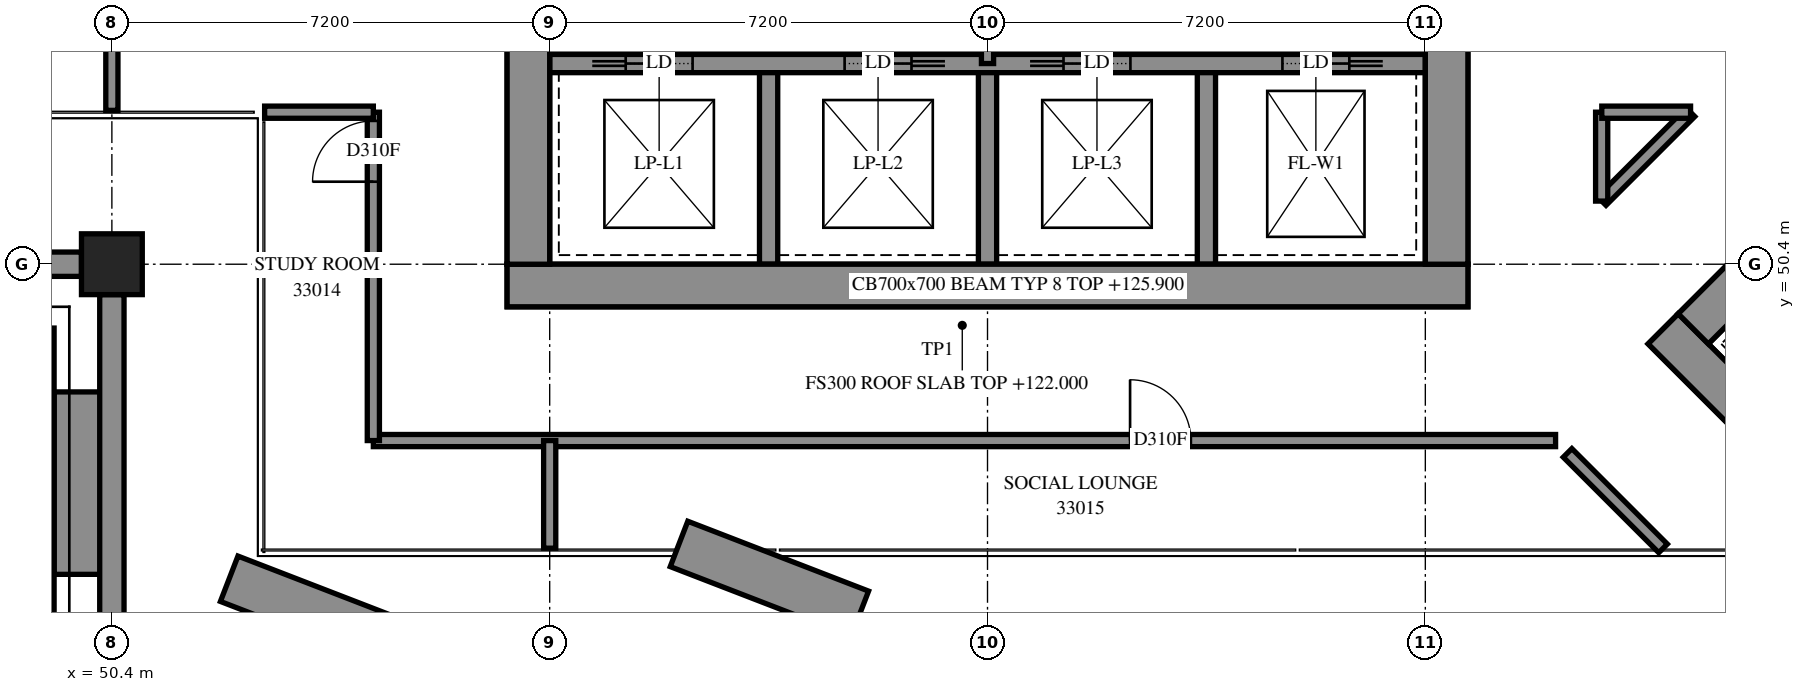
"""IFC4 building model, lengths in metres.
Left out: names, types, materials, properties, quantities, classifications, styles, units other than length and angle.
Written with IfcOpenShell. Run it as: python <this file> out.ifc"""

import sys

from ifc_helpers import new_model, si_unit, direction, frame, frame_2d, origin, origin_2d, place, context, subcontext, project, spatial, polyline, rectangle, outline, extrude, element, fill, save


model = new_model("IFC4")
c1 = context("Model", 3, precision=1e-05, world=origin(), true_north=direction((0.0, 1.0)))
c2 = subcontext(c1, "Body", "Model", "MODEL_VIEW")
j1 = project(units=[si_unit("LENGTHUNIT", "METRE"), si_unit("PLANEANGLEUNIT", "RADIAN")], contexts=[c1])
p1 = place(None, origin())
s1 = spatial("IfcSite", under=j1, at=p1, CompositionType="ELEMENT")
p2 = place(p1, origin())
s2 = spatial("IfcBuilding", under=s1, at=p2, CompositionType="ELEMENT")
p3 = place(p2, frame((0.0, 0.0, 122.0)))
s3 = spatial("IfcBuildingStorey", under=s2, at=p3, CompositionType="ELEMENT", Elevation=122.0)
p4 = place(p3, frame((50.4, 50.4, 0.0), z_axis=(0.0, 0.0, 1.0), x_axis=(1.0, 0.0, 0.0)))
e1 = element("IfcColumn", 1, at=p4, inside=s3, PredefinedType="COLUMN", context=c2, shape_type="SweptSolid", body=[
    extrude(rectangle(XDim=1.0, YDim=1.0, at=origin_2d()), origin(), (0.0, 0.0, 1.0), 3.9),
])
p5 = place(p3, frame((56.9, 50.05, -0.3), z_axis=(0.0, 0.0, 1.0), x_axis=(1.0, 0.0, 0.0)))
e2 = element("IfcWall", 2, at=p5, inside=s3, PredefinedType="SHEAR", context=c2, shape_type="SweptSolid", body=[
    extrude(rectangle(XDim=15.8, YDim=0.7, at=frame_2d((7.9, 0.0))), origin(), (0.0, 0.0, 1.0), 3.5),
])
p6 = place(p3, frame((57.25, 50.4, -0.3), z_axis=(0.0, 0.0, 1.0), x_axis=(0.0, 1.0, 0.0)))
e3 = element("IfcWall", 3, at=p6, inside=s3, PredefinedType="SHEAR", context=c2, shape_type="SweptSolid", body=[
    extrude(rectangle(XDim=14.4, YDim=0.7, at=frame_2d((7.2, 0.0))), origin(), (0.0, 0.0, 1.0), 3.5),
])
p7 = place(p6, frame((4.55, 0.0, 0.3)))
e4 = element("IfcOpeningElement", 4, at=p7, cuts=e3, PredefinedType="OPENING", context=c2, shape_type="SweptSolid", body=[
    extrude(rectangle(XDim=1.1, YDim=2.1, at=frame_2d((0.55, 1.05))), frame((0.0, 0.36, 0.0), z_axis=(0.0, -1.0, 0.0), x_axis=(1.0, 0.0, 0.0)), (0.0, 0.0, 1.0), 0.72),
])
p8 = place(p6, frame((11.35, 0.0, 0.3)))
e5 = element("IfcOpeningElement", 5, at=p8, cuts=e3, PredefinedType="OPENING", context=c2, shape_type="SweptSolid", body=[
    extrude(rectangle(XDim=1.1, YDim=2.1, at=frame_2d((0.55, 1.05))), frame((0.0, 0.36, 0.0), z_axis=(0.0, -1.0, 0.0), x_axis=(1.0, 0.0, 0.0)), (0.0, 0.0, 1.0), 0.72),
])
p9 = place(p3, frame((72.35, 50.4, -0.3), z_axis=(0.0, 0.0, 1.0), x_axis=(0.0, 1.0, 0.0)))
e6 = element("IfcWall", 6, at=p9, inside=s3, PredefinedType="SHEAR", context=c2, shape_type="SweptSolid", body=[
    extrude(rectangle(XDim=14.4, YDim=0.7, at=frame_2d((7.2, 0.0))), origin(), (0.0, 0.0, 1.0), 3.5),
])
p10 = place(p9, frame((4.55, 0.0, 0.3)))
e7 = element("IfcOpeningElement", 7, at=p10, cuts=e6, PredefinedType="OPENING", context=c2, shape_type="SweptSolid", body=[
    extrude(rectangle(XDim=1.1, YDim=2.1, at=frame_2d((0.55, 1.05))), frame((0.0, 0.36, 0.0), z_axis=(0.0, -1.0, 0.0), x_axis=(1.0, 0.0, 0.0)), (0.0, 0.0, 1.0), 0.72),
])
p11 = place(p9, frame((11.35, 0.0, 0.3)))
e8 = element("IfcOpeningElement", 8, at=p11, cuts=e6, PredefinedType="OPENING", context=c2, shape_type="SweptSolid", body=[
    extrude(rectangle(XDim=1.1, YDim=2.1, at=frame_2d((0.55, 1.05))), frame((0.0, 0.36, 0.0), z_axis=(0.0, -1.0, 0.0), x_axis=(1.0, 0.0, 0.0)), (0.0, 0.0, 1.0), 0.72),
])
for number, where, z_axis, x_axis in (
    (9, (61.2, 50.4, 0.0), (0.0, 0.0, 1.0), (0.0, 1.0, 0.0)),
    (10, (64.8, 50.4, 0.0), (0.0, 0.0, 1.0), (0.0, 1.0, 0.0)),
    (11, (68.4, 50.4, 0.0), (0.0, 0.0, 1.0), (0.0, 1.0, 0.0)),
):
    element("IfcWall", number, at=place(p3, frame(where, z_axis=z_axis, x_axis=x_axis)), inside=s3, PredefinedType="SOLIDWALL", context=c2, shape_type="SweptSolid", body=[
        extrude(rectangle(XDim=3.3, YDim=0.3, at=frame_2d((1.65, 0.0))), origin(), (0.0, 0.0, 1.0), 3.9),
    ])
p12 = place(p3, frame((57.6, 53.7, 0.0), z_axis=(0.0, 0.0, 1.0), x_axis=(1.0, 0.0, 0.0)))
e12 = element("IfcWall", 12, at=p12, inside=s3, PredefinedType="SOLIDWALL", context=c2, shape_type="SweptSolid", body=[
    extrude(rectangle(XDim=14.4, YDim=0.3, at=frame_2d((7.2, 0.0))), origin(), (0.0, 0.0, 1.0), 3.9),
])
p13 = place(p12, frame((1.25, 0.0, 0.0)))
e13 = element("IfcOpeningElement", 13, at=p13, cuts=e12, PredefinedType="OPENING", context=c2, shape_type="SweptSolid", body=[
    extrude(rectangle(XDim=1.1, YDim=2.1, at=frame_2d((0.55, 1.05))), frame((0.0, 0.16, 0.0), z_axis=(0.0, -1.0, 0.0), x_axis=(1.0, 0.0, 0.0)), (0.0, 0.0, 1.0), 0.32),
])
p14 = place(p12, frame((4.85, 0.0, 0.0)))
e14 = element("IfcOpeningElement", 14, at=p14, cuts=e12, PredefinedType="OPENING", context=c2, shape_type="SweptSolid", body=[
    extrude(rectangle(XDim=1.1, YDim=2.1, at=frame_2d((0.55, 1.05))), frame((0.0, 0.16, 0.0), z_axis=(0.0, -1.0, 0.0), x_axis=(1.0, 0.0, 0.0)), (0.0, 0.0, 1.0), 0.32),
])
p15 = place(p12, frame((8.45, 0.0, 0.0)))
e15 = element("IfcOpeningElement", 15, at=p15, cuts=e12, PredefinedType="OPENING", context=c2, shape_type="SweptSolid", body=[
    extrude(rectangle(XDim=1.1, YDim=2.1, at=frame_2d((0.55, 1.05))), frame((0.0, 0.16, 0.0), z_axis=(0.0, -1.0, 0.0), x_axis=(1.0, 0.0, 0.0)), (0.0, 0.0, 1.0), 0.32),
])
p16 = place(p12, frame((12.05, 0.0, 0.0)))
e16 = element("IfcOpeningElement", 16, at=p16, cuts=e12, PredefinedType="OPENING", context=c2, shape_type="SweptSolid", body=[
    extrude(rectangle(XDim=1.1, YDim=2.1, at=frame_2d((0.55, 1.05))), frame((0.0, 0.16, 0.0), z_axis=(0.0, -1.0, 0.0), x_axis=(1.0, 0.0, 0.0)), (0.0, 0.0, 1.0), 0.32),
])
p17 = place(p3, frame((75.912, 49.337, -0.3), z_axis=(0.0, 0.0, 1.0), x_axis=(0.7071036166, -0.7071099457, 0.0)))
e17 = element("IfcWall", 17, at=p17, inside=s3, PredefinedType="SHEAR", context=c2, shape_type="SweptSolid", body=[
    extrude(rectangle(XDim=15.8, YDim=0.7, at=frame_2d((7.9, 0.0))), origin(), (0.0, 0.0, 1.0), 3.5),
])
p18 = place(p3, frame((76.407, 49.337, -0.3), z_axis=(0.0, 0.0, 1.0), x_axis=(0.7071067812, 0.7071067812, 0.0)))
e18 = element("IfcWall", 18, at=p18, inside=s3, PredefinedType="SHEAR", context=c2, shape_type="SweptSolid", body=[
    extrude(rectangle(XDim=14.4, YDim=0.7, at=frame_2d((7.2, 0.0))), origin(), (0.0, 0.0, 1.0), 3.5),
])
p19 = place(p18, frame((4.55, 0.0, 0.3)))
e19 = element("IfcOpeningElement", 19, at=p19, cuts=e18, PredefinedType="OPENING", context=c2, shape_type="SweptSolid", body=[
    extrude(rectangle(XDim=1.1, YDim=2.1, at=frame_2d((0.55, 1.05))), frame((0.0, 0.36, 0.0), z_axis=(0.0, -1.0, 0.0), x_axis=(1.0, 0.0, 0.0)), (0.0, 0.0, 1.0), 0.72),
])
p20 = place(p18, frame((11.35, 0.0, 0.3)))
e20 = element("IfcOpeningElement", 20, at=p20, cuts=e18, PredefinedType="OPENING", context=c2, shape_type="SweptSolid", body=[
    extrude(rectangle(XDim=1.1, YDim=2.1, at=frame_2d((0.55, 1.05))), frame((0.0, 0.36, 0.0), z_axis=(0.0, -1.0, 0.0), x_axis=(1.0, 0.0, 0.0)), (0.0, 0.0, 1.0), 0.72),
])
p21 = place(p3, frame((49.85, 48.3, 0.0), z_axis=(0.0, 0.0, 1.0), x_axis=(0.0, -1.0, 0.0)))
e21 = element("IfcWall", 21, at=p21, inside=s3, PredefinedType="SOLIDWALL", context=c2, shape_type="SweptSolid", body=[
    extrude(rectangle(XDim=3.0, YDim=0.8, at=frame_2d((1.5, 0.0))), origin(), (0.0, 0.0, 1.0), 0.65),
])
p22 = place(p3, frame((62.7, 44.651, 0.0), z_axis=(0.0, 0.0, 1.0), x_axis=(-0.9328125164, 0.3603620531, 0.0)))
e22 = element("IfcWall", 22, at=p22, inside=s3, PredefinedType="SOLIDWALL", context=c2, shape_type="SweptSolid", body=[
    extrude(rectangle(XDim=3.187, YDim=0.8, at=frame_2d((1.594, 0.0))), origin(), (0.0, 0.0, 1.0), 0.65),
])
p23 = place(p3, frame((55.5, 44.002, 0.0), z_axis=(0.0, 0.0, 1.0), x_axis=(-0.9328024051, 0.3603882254, 0.0)))
e23 = element("IfcWall", 23, at=p23, inside=s3, PredefinedType="SOLIDWALL", context=c2, shape_type="SweptSolid", body=[
    extrude(rectangle(XDim=3.399, YDim=0.8, at=frame_2d((1.7, 0.0))), origin(), (0.0, 0.0, 1.0), 0.65),
])
p24 = place(p3, frame((42.15, 49.35, 0.0), z_axis=(0.0, 0.0, 1.0), x_axis=(1.0, 0.0, 0.0)))
e24 = element("IfcWall", 24, at=p24, inside=s3, PredefinedType="SOLIDWALL", context=c2, shape_type="SweptSolid", body=[
    extrude(outline(polyline([(-0.1, -0.1), (7.1, -0.1), (7.3, 0.1), (0.1, 0.1), (-0.1, -0.1)])), origin(), (0.0, 0.0, 1.0), 4.2),
])
p25 = place(p3, frame((49.35, 49.35, 0.0), z_axis=(0.0, 0.0, 1.0), x_axis=(0.0, -1.0, 0.0)))
e25 = element("IfcWall", 25, at=p25, inside=s3, PredefinedType="SOLIDWALL", context=c2, shape_type="SweptSolid", body=[
    extrude(outline(polyline([(0.1, -0.1), (7.3, -0.1), (7.1, 0.1), (-0.1, 0.1), (0.1, -0.1)])), origin(), (0.0, 0.0, 1.0), 4.2),
])
p26 = place(p3, frame((64.8, 53.7, 0.0), z_axis=(0.0, 0.0, 1.0), x_axis=(0.0, 1.0, 0.0)))
e26 = element("IfcWall", 26, at=p26, inside=s3, PredefinedType="PARTITIONING", context=c2, shape_type="SweptSolid", body=[
    extrude(rectangle(XDim=3.6, YDim=0.2, at=frame_2d((1.8, 0.0))), origin(), (0.0, 0.0, 1.0), 3.9),
])
p27 = place(p3, frame((54.7, 47.5, 0.0), z_axis=(0.0, 0.0, 1.0), x_axis=(1.0, 0.0, 0.0)))
e27 = element("IfcWall", 27, at=p27, inside=s3, PredefinedType="PARTITIONING", context=c2, shape_type="SweptSolid", body=[
    extrude(rectangle(XDim=19.442, YDim=0.2, at=frame_2d((9.721, 0.0))), origin(), (0.0, 0.0, 1.0), 3.9),
])
p28 = place(p27, frame((12.444, 0.0, 0.0)))
e28 = element("IfcOpeningElement", 28, at=p28, cuts=e27, PredefinedType="OPENING", context=c2, shape_type="SweptSolid", body=[
    extrude(rectangle(XDim=1.0, YDim=2.1, at=frame_2d((0.5, 1.05))), frame((0.0, 0.11, 0.0), z_axis=(0.0, -1.0, 0.0), x_axis=(1.0, 0.0, 0.0)), (0.0, 0.0, 1.0), 0.22),
])
p29 = place(p3, frame((54.7, 47.5, 0.0), z_axis=(0.0, 0.0, 1.0), x_axis=(0.0, 1.0, 0.0)))
e29 = element("IfcWall", 29, at=p29, inside=s3, PredefinedType="PARTITIONING", context=c2, shape_type="SweptSolid", body=[
    extrude(rectangle(XDim=5.4, YDim=0.2, at=frame_2d((2.7, 0.0))), origin(), (0.0, 0.0, 1.0), 3.9),
])
p30 = place(p29, frame((4.257, 0.0, 0.0)))
e30 = element("IfcOpeningElement", 30, at=p30, cuts=e29, PredefinedType="OPENING", context=c2, shape_type="SweptSolid", body=[
    extrude(rectangle(XDim=1.0, YDim=2.1, at=frame_2d((0.5, 1.05))), frame((0.0, 0.11, 0.0), z_axis=(0.0, -1.0, 0.0), x_axis=(1.0, 0.0, 0.0)), (0.0, 0.0, 1.0), 0.22),
])
p31 = place(p3, frame((74.339, 47.297, 0.0), z_axis=(0.0, 0.0, 1.0), x_axis=(0.7071067812, -0.7071067812, 0.0)))
e31 = element("IfcWall", 31, at=p31, inside=s3, PredefinedType="PARTITIONING", context=c2, shape_type="SweptSolid", body=[
    extrude(rectangle(XDim=2.22, YDim=0.2, at=frame_2d((1.11, 0.0))), origin(), (0.0, 0.0, 1.0), 3.9),
])
p32 = place(p3, frame((50.4, 52.93, 0.0), z_axis=(0.0, 0.0, 1.0), x_axis=(0.0, 1.0, 0.0)))
e32 = element("IfcWall", 32, at=p32, inside=s3, PredefinedType="PARTITIONING", context=c2, shape_type="SweptSolid", body=[
    extrude(rectangle(XDim=2.17, YDim=0.2, at=frame_2d((1.085, 0.0))), origin(), (0.0, 0.0, 1.0), 3.9),
])
p33 = place(p3, frame((74.901, 51.439, 0.0), z_axis=(0.0, 0.0, 1.0), x_axis=(0.7071067812, 0.7071067812, 0.0)))
e33 = element("IfcWall", 33, at=p33, inside=s3, PredefinedType="PARTITIONING", context=c2, shape_type="SweptSolid", body=[
    extrude(rectangle(XDim=2.065, YDim=0.2, at=frame_2d((1.032, 0.0))), origin(), (0.0, 0.0, 1.0), 3.9),
])
p34 = place(p3, frame((52.912, 52.9, 0.0), z_axis=(0.0, 0.0, 1.0), x_axis=(1.0, 0.0, 0.0)))
e34 = element("IfcWall", 34, at=p34, inside=s3, PredefinedType="PARTITIONING", context=c2, shape_type="SweptSolid", body=[
    extrude(rectangle(XDim=1.788, YDim=0.2, at=frame_2d((0.894, 0.0))), origin(), (0.0, 0.0, 1.0), 3.9),
])
p35 = place(p3, frame((57.6, 45.73, 0.0), z_axis=(0.0, 0.0, 1.0), x_axis=(0.0, 1.0, 0.0)))
e35 = element("IfcWall", 35, at=p35, inside=s3, PredefinedType="PARTITIONING", context=c2, shape_type="SweptSolid", body=[
    extrude(rectangle(XDim=1.77, YDim=0.2, at=frame_2d((0.885, 0.0))), origin(), (0.0, 0.0, 1.0), 3.9),
])
p36 = place(p3, frame((74.9, 51.438, 0.0), z_axis=(0.0, 0.0, 1.0), x_axis=(0.0, 1.0, 0.0)))
e36 = element("IfcWall", 36, at=p36, inside=s3, PredefinedType="PARTITIONING", context=c2, shape_type="SweptSolid", body=[
    extrude(rectangle(XDim=1.462, YDim=0.2, at=frame_2d((0.731, 0.0))), origin(), (0.0, 0.0, 1.0), 3.9),
])
p37 = place(p3, frame((74.902, 52.9, 0.0), z_axis=(0.0, 0.0, 1.0), x_axis=(1.0, 0.0, 0.0)))
e37 = element("IfcWall", 37, at=p37, inside=s3, PredefinedType="PARTITIONING", context=c2, shape_type="SweptSolid", body=[
    extrude(rectangle(XDim=1.46, YDim=0.2, at=frame_2d((0.73, 0.0))), origin(), (0.0, 0.0, 1.0), 3.9),
])
p38 = place(p13, origin())
e38 = element("IfcDoor", 38, at=p38, inside=s3, OperationType="SLIDING_TO_LEFT", PredefinedType="DOOR", context=c2, shape_type="SweptSolid", body=[
    extrude(rectangle(XDim=1.1, YDim=2.1, at=frame_2d((0.55, 1.05))), frame((0.0, 0.025, 0.0), z_axis=(0.0, -1.0, 0.0), x_axis=(1.0, 0.0, 0.0)), (0.0, 0.0, 1.0), 0.05),
])
fill(e13, e38)
p39 = place(p14, origin())
e39 = element("IfcDoor", 39, at=p39, inside=s3, OperationType="SLIDING_TO_RIGHT", PredefinedType="DOOR", context=c2, shape_type="SweptSolid", body=[
    extrude(rectangle(XDim=1.1, YDim=2.1, at=frame_2d((0.55, 1.05))), frame((0.0, 0.025, 0.0), z_axis=(0.0, -1.0, 0.0), x_axis=(1.0, 0.0, 0.0)), (0.0, 0.0, 1.0), 0.05),
])
fill(e14, e39)
p40 = place(p15, origin())
e40 = element("IfcDoor", 40, at=p40, inside=s3, OperationType="SLIDING_TO_LEFT", PredefinedType="DOOR", context=c2, shape_type="SweptSolid", body=[
    extrude(rectangle(XDim=1.1, YDim=2.1, at=frame_2d((0.55, 1.05))), frame((0.0, 0.025, 0.0), z_axis=(0.0, -1.0, 0.0), x_axis=(1.0, 0.0, 0.0)), (0.0, 0.0, 1.0), 0.05),
])
fill(e15, e40)
p41 = place(p16, origin())
e41 = element("IfcDoor", 41, at=p41, inside=s3, OperationType="SLIDING_TO_RIGHT", PredefinedType="DOOR", context=c2, shape_type="SweptSolid", body=[
    extrude(rectangle(XDim=1.1, YDim=2.1, at=frame_2d((0.55, 1.05))), frame((0.0, 0.025, 0.0), z_axis=(0.0, -1.0, 0.0), x_axis=(1.0, 0.0, 0.0)), (0.0, 0.0, 1.0), 0.05),
])
fill(e16, e41)
p42 = place(p30, origin())
e42 = element("IfcDoor", 42, at=p42, inside=s3, OperationType="SINGLE_SWING_LEFT", PredefinedType="DOOR", context=c2, shape_type="SweptSolid", body=[
    extrude(rectangle(XDim=1.0, YDim=2.1, at=frame_2d((0.5, 1.05))), frame((0.0, 0.025, 0.0), z_axis=(0.0, -1.0, 0.0), x_axis=(1.0, 0.0, 0.0)), (0.0, 0.0, 1.0), 0.05),
])
fill(e30, e42)
p43 = place(p28, origin())
e43 = element("IfcDoor", 43, at=p43, inside=s3, OperationType="SINGLE_SWING_LEFT", PredefinedType="DOOR", context=c2, shape_type="SweptSolid", body=[
    extrude(rectangle(XDim=1.0, YDim=2.1, at=frame_2d((0.5, 1.05))), frame((0.0, 0.025, 0.0), z_axis=(0.0, -1.0, 0.0), x_axis=(1.0, 0.0, 0.0)), (0.0, 0.0, 1.0), 0.05),
])
fill(e28, e43)
save(model, sys.argv[1])
